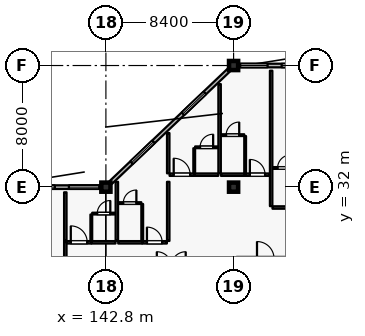
"""IFC4 building model, lengths in metres.
Left out: names, types, materials, properties, quantities, classifications, styles, units other than length and angle.
Written with IfcOpenShell. Run it as: python <this file> out.ifc"""

import sys

from ifc_helpers import new_model, si_unit, direction, frame, frame_2d, origin, origin_2d, place, context, subcontext, project, spatial, rectangle, extrude, element, fill, save


model = new_model("IFC4")
c1 = context("Model", 3, precision=1e-05, world=origin(), true_north=direction((0.0, 1.0)))
c2 = subcontext(c1, "Body", "Model", "MODEL_VIEW")
j1 = project(units=[si_unit("LENGTHUNIT", "METRE"), si_unit("PLANEANGLEUNIT", "RADIAN")], contexts=[c1])
p1 = place(None, origin())
s1 = spatial("IfcSite", under=j1, at=p1, CompositionType="ELEMENT")
p2 = place(p1, origin())
s2 = spatial("IfcBuilding", under=s1, at=p2, CompositionType="ELEMENT")
p3 = place(p2, frame((0.0, 0.0, 43.2)))
s3 = spatial("IfcBuildingStorey", under=s2, at=p3, CompositionType="ELEMENT", Elevation=43.2)
for number, where, z_axis, x_axis in (
    (1, (142.8, 32.0, 0.0), (0.0, 0.0, 1.0), (1.0, 0.0, 0.0)),
    (2, (151.2, 40.0, 0.0), (0.0, 0.0, 1.0), (1.0, 0.0, 0.0)),
    (3, (151.2, 32.0, 0.0), (0.0, 0.0, 1.0), (1.0, 0.0, 0.0)),
):
    element("IfcColumn", number, at=place(p3, frame(where, z_axis=z_axis, x_axis=x_axis)), inside=s3, PredefinedType="COLUMN", context=c2, shape_type="SweptSolid", body=[
        extrude(rectangle(XDim=0.6, YDim=0.6, at=origin_2d()), origin(), (0.0, 0.0, 1.0), 4.2),
    ])
p4 = place(p3, frame((134.7, 32.0, 0.0), z_axis=(0.0, 0.0, 1.0), x_axis=(1.0, 0.0, 0.0)))
e4 = element("IfcWall", 4, at=p4, inside=s3, PredefinedType="SOLIDWALL", context=c2, shape_type="SweptSolid", body=[
    extrude(rectangle(XDim=7.8, YDim=0.24, at=frame_2d((3.9, 0.0))), origin(), (0.0, 0.0, 1.0), 3.54),
])
p5 = place(p4, frame((0.175, 0.0, 0.8)))
e5 = element("IfcOpeningElement", 5, at=p5, cuts=e4, PredefinedType="OPENING", context=c2, shape_type="SweptSolid", body=[
    extrude(rectangle(XDim=1.6, YDim=1.6, at=frame_2d((0.8, 0.8))), frame((0.0, 0.13, 0.0), z_axis=(0.0, -1.0, 0.0), x_axis=(1.0, 0.0, 0.0)), (0.0, 0.0, 1.0), 0.26),
])
p6 = place(p4, frame((2.74, 0.0, 0.8)))
e6 = element("IfcOpeningElement", 6, at=p6, cuts=e4, PredefinedType="OPENING", context=c2, shape_type="SweptSolid", body=[
    extrude(rectangle(XDim=2.0, YDim=1.75, at=frame_2d((1.0, 0.875))), frame((0.0, 0.13, 0.0), z_axis=(0.0, -1.0, 0.0), x_axis=(1.0, 0.0, 0.0)), (0.0, 0.0, 1.0), 0.26),
])
p7 = place(p4, frame((5.665, 0.0, 0.8)))
e7 = element("IfcOpeningElement", 7, at=p7, cuts=e4, PredefinedType="OPENING", context=c2, shape_type="SweptSolid", body=[
    extrude(rectangle(XDim=2.0, YDim=1.75, at=frame_2d((1.0, 0.875))), frame((0.0, 0.13, 0.0), z_axis=(0.0, -1.0, 0.0), x_axis=(1.0, 0.0, 0.0)), (0.0, 0.0, 1.0), 0.26),
])
p8 = place(p3, frame((143.1, 32.286, 0.0), z_axis=(0.0, 0.0, 1.0), x_axis=(0.724145477467, 0.689647248573, 0.0)))
e8 = element("IfcWall", 8, at=p8, inside=s3, PredefinedType="SOLIDWALL", context=c2, shape_type="SweptSolid", body=[
    extrude(rectangle(XDim=10.771, YDim=0.24, at=frame_2d((5.385, 0.0))), origin(), (0.0, 0.0, 1.0), 3.54),
])
p9 = place(p8, frame((1.914, 0.0, 0.8)))
e9 = element("IfcOpeningElement", 9, at=p9, cuts=e8, PredefinedType="OPENING", context=c2, shape_type="SweptSolid", body=[
    extrude(rectangle(XDim=2.0, YDim=1.75, at=frame_2d((1.0, 0.875))), frame((0.0, 0.13, 0.0), z_axis=(0.0, -1.0, 0.0), x_axis=(1.0, 0.0, 0.0)), (0.0, 0.0, 1.0), 0.26),
])
p10 = place(p8, frame((6.581, 0.0, 0.8)))
e10 = element("IfcOpeningElement", 10, at=p10, cuts=e8, PredefinedType="OPENING", context=c2, shape_type="SweptSolid", body=[
    extrude(rectangle(XDim=2.0, YDim=1.75, at=frame_2d((1.0, 0.875))), frame((0.0, 0.13, 0.0), z_axis=(0.0, -1.0, 0.0), x_axis=(1.0, 0.0, 0.0)), (0.0, 0.0, 1.0), 0.26),
])
p11 = place(p3, frame((151.5, 40.0, 0.0), z_axis=(0.0, 0.0, 1.0), x_axis=(1.0, 0.0, 0.0)))
e11 = element("IfcWall", 11, at=p11, inside=s3, PredefinedType="SOLIDWALL", context=c2, shape_type="SweptSolid", body=[
    extrude(rectangle(XDim=7.8, YDim=0.24, at=frame_2d((3.9, 0.0))), origin(), (0.0, 0.0, 1.0), 3.49),
])
p12 = place(p11, frame((0.135, 0.0, 0.8)))
e12 = element("IfcOpeningElement", 12, at=p12, cuts=e11, PredefinedType="OPENING", context=c2, shape_type="SweptSolid", body=[
    extrude(rectangle(XDim=1.8, YDim=1.7, at=frame_2d((0.9, 0.85))), frame((0.0, 0.13, 0.0), z_axis=(0.0, -1.0, 0.0), x_axis=(1.0, 0.0, 0.0)), (0.0, 0.0, 1.0), 0.26),
])
p13 = place(p11, frame((2.86, 0.0, 0.8)))
e13 = element("IfcOpeningElement", 13, at=p13, cuts=e11, PredefinedType="OPENING", context=c2, shape_type="SweptSolid", body=[
    extrude(rectangle(XDim=2.0, YDim=1.75, at=frame_2d((1.0, 0.875))), frame((0.0, 0.13, 0.0), z_axis=(0.0, -1.0, 0.0), x_axis=(1.0, 0.0, 0.0)), (0.0, 0.0, 1.0), 0.26),
])
p14 = place(p11, frame((5.825, 0.0, 0.8)))
e14 = element("IfcOpeningElement", 14, at=p14, cuts=e11, PredefinedType="OPENING", context=c2, shape_type="SweptSolid", body=[
    extrude(rectangle(XDim=1.8, YDim=1.7, at=frame_2d((0.9, 0.85))), frame((0.0, 0.13, 0.0), z_axis=(0.0, -1.0, 0.0), x_axis=(1.0, 0.0, 0.0)), (0.0, 0.0, 1.0), 0.26),
])
p15 = place(p3, frame((140.13, 25.06, 0.0), z_axis=(0.0, 0.0, 1.0), x_axis=(0.0, 1.0, 0.0)))
e15 = element("IfcWall", 15, at=p15, inside=s3, PredefinedType="PARTITIONING", context=c2, shape_type="SweptSolid", body=[
    extrude(rectangle(XDim=3.39, YDim=0.16, at=frame_2d((1.695, 0.0))), origin(), (0.0, 0.0, 1.0), 3.935),
])
p16 = place(p3, frame((140.22, 28.37, 0.0), z_axis=(0.0, 0.0, 1.0), x_axis=(1.0, 0.0, 0.0)))
e16 = element("IfcWall", 16, at=p16, inside=s3, PredefinedType="PARTITIONING", context=c2, shape_type="SweptSolid", body=[
    extrude(rectangle(XDim=1.62, YDim=0.16, at=frame_2d((0.81, 0.0))), origin(), (0.0, 0.0, 1.0), 3.935),
])
p17 = place(p16, frame((0.27, 0.0, 0.0)))
e17 = element("IfcOpeningElement", 17, at=p17, cuts=e16, PredefinedType="OPENING", context=c2, shape_type="SweptSolid", body=[
    extrude(rectangle(XDim=1.08, YDim=2.3, at=frame_2d((0.54, 1.15))), frame((0.0, 0.09, 0.0), z_axis=(0.0, -1.0, 0.0), x_axis=(1.0, 0.0, 0.0)), (0.0, 0.0, 1.0), 0.18),
])
p18 = place(p3, frame((141.85, 28.37, 0.0), z_axis=(0.0, 0.0, 1.0), x_axis=(1.0, 0.0, 0.0)))
e18 = element("IfcWall", 18, at=p18, inside=s3, PredefinedType="PARTITIONING", context=c2, shape_type="SweptSolid", body=[
    extrude(rectangle(XDim=1.58, YDim=0.16, at=frame_2d((0.79, 0.0))), origin(), (0.0, 0.0, 1.0), 3.935),
])
p19 = place(p3, frame((141.84, 28.46, 0.0), z_axis=(0.0, 0.0, 1.0), x_axis=(0.0, 1.0, 0.0)))
e19 = element("IfcWall", 19, at=p19, inside=s3, PredefinedType="PARTITIONING", context=c2, shape_type="SweptSolid", body=[
    extrude(rectangle(XDim=1.74, YDim=0.115, at=frame_2d((0.87, 0.0))), origin(), (0.0, 0.0, 1.0), 3.935),
])
p20 = place(p3, frame((141.9, 30.26, 0.0), z_axis=(0.0, 0.0, 1.0), x_axis=(1.0, 0.0, 0.0)))
e20 = element("IfcWall", 20, at=p20, inside=s3, PredefinedType="PARTITIONING", context=c2, shape_type="SweptSolid", body=[
    extrude(rectangle(XDim=1.52, YDim=0.115, at=frame_2d((0.76, 0.0))), origin(), (0.0, 0.0, 1.0), 3.935),
])
p21 = place(p20, frame((0.33, 0.0, 0.0)))
e21 = element("IfcOpeningElement", 21, at=p21, cuts=e20, PredefinedType="OPENING", context=c2, shape_type="SweptSolid", body=[
    extrude(rectangle(XDim=0.86, YDim=2.12, at=frame_2d((0.43, 1.06))), frame((0.0, 0.067, 0.0), z_axis=(0.0, -1.0, 0.0), x_axis=(1.0, 0.0, 0.0)), (0.0, 0.0, 1.0), 0.135),
])
p22 = place(p3, frame((140.13, 28.46, 0.0), z_axis=(0.0, 0.0, 1.0), x_axis=(0.0, 1.0, 0.0)))
e22 = element("IfcWall", 22, at=p22, inside=s3, PredefinedType="PARTITIONING", context=c2, shape_type="SweptSolid", body=[
    extrude(rectangle(XDim=3.2, YDim=0.16, at=frame_2d((1.6, 0.0))), origin(), (0.0, 0.0, 1.0), 3.935),
])
p23 = place(p3, frame((143.61, 28.37, 0.0), z_axis=(0.0, 0.0, 1.0), x_axis=(1.0, 0.0, 0.0)))
e23 = element("IfcWall", 23, at=p23, inside=s3, PredefinedType="PARTITIONING", context=c2, shape_type="SweptSolid", body=[
    extrude(rectangle(XDim=1.57, YDim=0.16, at=frame_2d((0.785, 0.0))), origin(), (0.0, 0.0, 1.0), 3.935),
])
p24 = place(p3, frame((145.19, 28.37, 0.0), z_axis=(0.0, 0.0, 1.0), x_axis=(1.0, 0.0, 0.0)))
e24 = element("IfcWall", 24, at=p24, inside=s3, PredefinedType="PARTITIONING", context=c2, shape_type="SweptSolid", body=[
    extrude(rectangle(XDim=1.62, YDim=0.16, at=frame_2d((0.81, 0.0))), origin(), (0.0, 0.0, 1.0), 3.935),
])
p25 = place(p24, frame((0.31, 0.0, 0.0)))
e25 = element("IfcOpeningElement", 25, at=p25, cuts=e24, PredefinedType="OPENING", context=c2, shape_type="SweptSolid", body=[
    extrude(rectangle(XDim=1.0, YDim=2.25, at=frame_2d((0.5, 1.125))), frame((0.0, 0.09, 0.0), z_axis=(0.0, -1.0, 0.0), x_axis=(1.0, 0.0, 0.0)), (0.0, 0.0, 1.0), 0.18),
])
p26 = place(p3, frame((145.19, 28.46, 0.0), z_axis=(0.0, 0.0, 1.0), x_axis=(0.0, 1.0, 0.0)))
e26 = element("IfcWall", 26, at=p26, inside=s3, PredefinedType="PARTITIONING", context=c2, shape_type="SweptSolid", body=[
    extrude(rectangle(XDim=2.43, YDim=0.115, at=frame_2d((1.215, 0.0))), origin(), (0.0, 0.0, 1.0), 3.935),
])
p27 = place(p3, frame((143.62, 30.95, 0.0), z_axis=(0.0, 0.0, 1.0), x_axis=(1.0, 0.0, 0.0)))
e27 = element("IfcWall", 27, at=p27, inside=s3, PredefinedType="PARTITIONING", context=c2, shape_type="SweptSolid", body=[
    extrude(rectangle(XDim=1.51, YDim=0.115, at=frame_2d((0.755, 0.0))), origin(), (0.0, 0.0, 1.0), 3.935),
])
p28 = place(p27, frame((0.325, 0.0, 0.0)))
e28 = element("IfcOpeningElement", 28, at=p28, cuts=e27, PredefinedType="OPENING", context=c2, shape_type="SweptSolid", body=[
    extrude(rectangle(XDim=0.86, YDim=2.12, at=frame_2d((0.43, 1.06))), frame((0.0, 0.067, 0.0), z_axis=(0.0, -1.0, 0.0), x_axis=(1.0, 0.0, 0.0)), (0.0, 0.0, 1.0), 0.135),
])
for number, where, z_axis, x_axis in (
    (29, (143.52, 28.46, 0.0), (0.0, 0.0, 1.0), (0.0, 1.0, 0.0)),
    (30, (146.9, 28.46, 0.0), (0.0, 0.0, 1.0), (0.0, 1.0, 0.0)),
):
    element("IfcWall", number, at=place(p3, frame(where, z_axis=z_axis, x_axis=x_axis)), inside=s3, PredefinedType="PARTITIONING", context=c2, shape_type="SweptSolid", body=[
        extrude(rectangle(XDim=3.89, YDim=0.16, at=frame_2d((1.945, 0.0))), origin(), (0.0, 0.0, 1.0), 3.935),
    ])
p29 = place(p3, frame((146.99, 32.82, 0.0), z_axis=(0.0, 0.0, 1.0), x_axis=(1.0, 0.0, 0.0)))
e31 = element("IfcWall", 31, at=p29, inside=s3, PredefinedType="PARTITIONING", context=c2, shape_type="SweptSolid", body=[
    extrude(rectangle(XDim=1.62, YDim=0.16, at=frame_2d((0.81, 0.0))), origin(), (0.0, 0.0, 1.0), 3.935),
])
p30 = place(p29, frame((0.27, 0.0, 0.0)))
e32 = element("IfcOpeningElement", 32, at=p30, cuts=e31, PredefinedType="OPENING", context=c2, shape_type="SweptSolid", body=[
    extrude(rectangle(XDim=1.08, YDim=2.3, at=frame_2d((0.54, 1.15))), frame((0.0, 0.09, 0.0), z_axis=(0.0, -1.0, 0.0), x_axis=(1.0, 0.0, 0.0)), (0.0, 0.0, 1.0), 0.18),
])
p31 = place(p3, frame((148.62, 32.82, 0.0), z_axis=(0.0, 0.0, 1.0), x_axis=(1.0, 0.0, 0.0)))
e33 = element("IfcWall", 33, at=p31, inside=s3, PredefinedType="PARTITIONING", context=c2, shape_type="SweptSolid", body=[
    extrude(rectangle(XDim=1.57, YDim=0.16, at=frame_2d((0.785, 0.0))), origin(), (0.0, 0.0, 1.0), 3.935),
])
p32 = place(p3, frame((148.61, 32.91, 0.0), z_axis=(0.0, 0.0, 1.0), x_axis=(0.0, 1.0, 0.0)))
e34 = element("IfcWall", 34, at=p32, inside=s3, PredefinedType="PARTITIONING", context=c2, shape_type="SweptSolid", body=[
    extrude(rectangle(XDim=1.65, YDim=0.115, at=frame_2d((0.825, 0.0))), origin(), (0.0, 0.0, 1.0), 3.935),
])
p33 = place(p3, frame((148.67, 34.62, 0.0), z_axis=(0.0, 0.0, 1.0), x_axis=(1.0, 0.0, 0.0)))
e35 = element("IfcWall", 35, at=p33, inside=s3, PredefinedType="PARTITIONING", context=c2, shape_type="SweptSolid", body=[
    extrude(rectangle(XDim=1.51, YDim=0.115, at=frame_2d((0.755, 0.0))), origin(), (0.0, 0.0, 1.0), 3.935),
])
p34 = place(p33, frame((0.325, 0.0, 0.0)))
e36 = element("IfcOpeningElement", 36, at=p34, cuts=e35, PredefinedType="OPENING", context=c2, shape_type="SweptSolid", body=[
    extrude(rectangle(XDim=0.86, YDim=2.12, at=frame_2d((0.43, 1.06))), frame((0.0, 0.067, 0.0), z_axis=(0.0, -1.0, 0.0), x_axis=(1.0, 0.0, 0.0)), (0.0, 0.0, 1.0), 0.135),
])
p35 = place(p3, frame((146.9, 32.91, 0.0), z_axis=(0.0, 0.0, 1.0), x_axis=(0.0, 1.0, 0.0)))
e37 = element("IfcWall", 37, at=p35, inside=s3, PredefinedType="PARTITIONING", context=c2, shape_type="SweptSolid", body=[
    extrude(rectangle(XDim=2.65, YDim=0.16, at=frame_2d((1.325, 0.0))), origin(), (0.0, 0.0, 1.0), 3.935),
])
p36 = place(p3, frame((150.37, 32.82, 0.0), z_axis=(0.0, 0.0, 1.0), x_axis=(1.0, 0.0, 0.0)))
e38 = element("IfcWall", 38, at=p36, inside=s3, PredefinedType="PARTITIONING", context=c2, shape_type="SweptSolid", body=[
    extrude(rectangle(XDim=1.58, YDim=0.16, at=frame_2d((0.79, 0.0))), origin(), (0.0, 0.0, 1.0), 3.935),
])
p37 = place(p3, frame((151.96, 32.82, 0.0), z_axis=(0.0, 0.0, 1.0), x_axis=(1.0, 0.0, 0.0)))
e39 = element("IfcWall", 39, at=p37, inside=s3, PredefinedType="PARTITIONING", context=c2, shape_type="SweptSolid", body=[
    extrude(rectangle(XDim=1.62, YDim=0.16, at=frame_2d((0.81, 0.0))), origin(), (0.0, 0.0, 1.0), 3.935),
])
p38 = place(p37, frame((0.31, 0.0, 0.0)))
e40 = element("IfcOpeningElement", 40, at=p38, cuts=e39, PredefinedType="OPENING", context=c2, shape_type="SweptSolid", body=[
    extrude(rectangle(XDim=1.0, YDim=2.25, at=frame_2d((0.5, 1.125))), frame((0.0, 0.09, 0.0), z_axis=(0.0, -1.0, 0.0), x_axis=(1.0, 0.0, 0.0)), (0.0, 0.0, 1.0), 0.18),
])
p39 = place(p3, frame((151.96, 32.91, 0.0), z_axis=(0.0, 0.0, 1.0), x_axis=(0.0, 1.0, 0.0)))
e41 = element("IfcWall", 41, at=p39, inside=s3, PredefinedType="PARTITIONING", context=c2, shape_type="SweptSolid", body=[
    extrude(rectangle(XDim=2.45, YDim=0.115, at=frame_2d((1.225, 0.0))), origin(), (0.0, 0.0, 1.0), 3.935),
])
p40 = place(p3, frame((150.38, 35.42, 0.0), z_axis=(0.0, 0.0, 1.0), x_axis=(1.0, 0.0, 0.0)))
e42 = element("IfcWall", 42, at=p40, inside=s3, PredefinedType="PARTITIONING", context=c2, shape_type="SweptSolid", body=[
    extrude(rectangle(XDim=1.52, YDim=0.115, at=frame_2d((0.76, 0.0))), origin(), (0.0, 0.0, 1.0), 3.935),
])
p41 = place(p40, frame((0.33, 0.0, 0.0)))
e43 = element("IfcOpeningElement", 43, at=p41, cuts=e42, PredefinedType="OPENING", context=c2, shape_type="SweptSolid", body=[
    extrude(rectangle(XDim=0.86, YDim=2.12, at=frame_2d((0.43, 1.06))), frame((0.0, 0.067, 0.0), z_axis=(0.0, -1.0, 0.0), x_axis=(1.0, 0.0, 0.0)), (0.0, 0.0, 1.0), 0.135),
])
p42 = place(p3, frame((150.28, 32.91, 0.0), z_axis=(0.0, 0.0, 1.0), x_axis=(0.0, 1.0, 0.0)))
e44 = element("IfcWall", 44, at=p42, inside=s3, PredefinedType="PARTITIONING", context=c2, shape_type="SweptSolid", body=[
    extrude(rectangle(XDim=5.87, YDim=0.16, at=frame_2d((2.935, 0.0))), origin(), (0.0, 0.0, 1.0), 3.935),
])
p43 = place(p3, frame((153.76, 30.66, 0.0), z_axis=(0.0, 0.0, 1.0), x_axis=(1.0, 0.0, 0.0)))
e45 = element("IfcWall", 45, at=p43, inside=s3, PredefinedType="PARTITIONING", context=c2, shape_type="SweptSolid", body=[
    extrude(rectangle(XDim=1.57, YDim=0.16, at=frame_2d((0.785, 0.0))), origin(), (0.0, 0.0, 1.0), 3.935),
])
p44 = place(p3, frame((153.77, 33.26, 0.0), z_axis=(0.0, 0.0, 1.0), x_axis=(1.0, 0.0, 0.0)))
e46 = element("IfcWall", 46, at=p44, inside=s3, PredefinedType="PARTITIONING", context=c2, shape_type="SweptSolid", body=[
    extrude(rectangle(XDim=1.51, YDim=0.115, at=frame_2d((0.755, 0.0))), origin(), (0.0, 0.0, 1.0), 3.935),
])
p45 = place(p44, frame((0.325, 0.0, 0.0)))
e47 = element("IfcOpeningElement", 47, at=p45, cuts=e46, PredefinedType="OPENING", context=c2, shape_type="SweptSolid", body=[
    extrude(rectangle(XDim=0.86, YDim=2.12, at=frame_2d((0.43, 1.06))), frame((0.0, 0.067, 0.0), z_axis=(0.0, -1.0, 0.0), x_axis=(1.0, 0.0, 0.0)), (0.0, 0.0, 1.0), 0.135),
])
p46 = place(p3, frame((153.67, 30.75, 0.0), z_axis=(0.0, 0.0, 1.0), x_axis=(0.0, 1.0, 0.0)))
e48 = element("IfcWall", 48, at=p46, inside=s3, PredefinedType="PARTITIONING", context=c2, shape_type="SweptSolid", body=[
    extrude(rectangle(XDim=8.91, YDim=0.16, at=frame_2d((4.455, 0.0))), origin(), (0.0, 0.0, 1.0), 3.935),
])
p47 = place(p6, origin())
e49 = element("IfcWindow", 49, at=p47, inside=s3, PartitioningType="DOUBLE_PANEL_VERTICAL", PredefinedType="WINDOW", context=c2, shape_type="SweptSolid", body=[
    extrude(rectangle(XDim=2.0, YDim=1.75, at=frame_2d((1.0, 0.875))), frame((0.0, 0.03, 0.0), z_axis=(0.0, -1.0, 0.0), x_axis=(1.0, 0.0, 0.0)), (0.0, 0.0, 1.0), 0.06),
])
fill(e6, e49)
p48 = place(p7, origin())
e50 = element("IfcWindow", 50, at=p48, inside=s3, PartitioningType="DOUBLE_PANEL_VERTICAL", PredefinedType="WINDOW", context=c2, shape_type="SweptSolid", body=[
    extrude(rectangle(XDim=2.0, YDim=1.75, at=frame_2d((1.0, 0.875))), frame((0.0, 0.03, 0.0), z_axis=(0.0, -1.0, 0.0), x_axis=(1.0, 0.0, 0.0)), (0.0, 0.0, 1.0), 0.06),
])
fill(e7, e50)
p49 = place(p9, origin())
e51 = element("IfcWindow", 51, at=p49, inside=s3, PartitioningType="DOUBLE_PANEL_VERTICAL", PredefinedType="WINDOW", context=c2, shape_type="SweptSolid", body=[
    extrude(rectangle(XDim=2.0, YDim=1.75, at=frame_2d((1.0, 0.875))), frame((0.0, 0.03, 0.0), z_axis=(0.0, -1.0, 0.0), x_axis=(1.0, 0.0, 0.0)), (0.0, 0.0, 1.0), 0.06),
])
fill(e9, e51)
p50 = place(p10, origin())
e52 = element("IfcWindow", 52, at=p50, inside=s3, PartitioningType="DOUBLE_PANEL_VERTICAL", PredefinedType="WINDOW", context=c2, shape_type="SweptSolid", body=[
    extrude(rectangle(XDim=2.0, YDim=1.75, at=frame_2d((1.0, 0.875))), frame((0.0, 0.03, 0.0), z_axis=(0.0, -1.0, 0.0), x_axis=(1.0, 0.0, 0.0)), (0.0, 0.0, 1.0), 0.06),
])
fill(e10, e52)
p51 = place(p12, origin())
e53 = element("IfcWindow", 53, at=p51, inside=s3, PartitioningType="DOUBLE_PANEL_VERTICAL", PredefinedType="WINDOW", context=c2, shape_type="SweptSolid", body=[
    extrude(rectangle(XDim=1.8, YDim=1.7, at=frame_2d((0.9, 0.85))), frame((0.0, 0.03, 0.0), z_axis=(0.0, -1.0, 0.0), x_axis=(1.0, 0.0, 0.0)), (0.0, 0.0, 1.0), 0.06),
])
fill(e12, e53)
p52 = place(p13, origin())
e54 = element("IfcWindow", 54, at=p52, inside=s3, PartitioningType="DOUBLE_PANEL_VERTICAL", PredefinedType="WINDOW", context=c2, shape_type="SweptSolid", body=[
    extrude(rectangle(XDim=2.0, YDim=1.75, at=frame_2d((1.0, 0.875))), frame((0.0, 0.03, 0.0), z_axis=(0.0, -1.0, 0.0), x_axis=(1.0, 0.0, 0.0)), (0.0, 0.0, 1.0), 0.06),
])
fill(e13, e54)
p53 = place(p17, origin())
e55 = element("IfcDoor", 55, at=p53, inside=s3, OperationType="SINGLE_SWING_LEFT", PredefinedType="DOOR", context=c2, shape_type="SweptSolid", body=[
    extrude(rectangle(XDim=1.08, YDim=2.3, at=frame_2d((0.54, 1.15))), frame((0.0, 0.025, 0.0), z_axis=(0.0, -1.0, 0.0), x_axis=(1.0, 0.0, 0.0)), (0.0, 0.0, 1.0), 0.05),
])
fill(e17, e55)
p54 = place(p21, origin())
e56 = element("IfcDoor", 56, at=p54, inside=s3, OperationType="SINGLE_SWING_RIGHT", PredefinedType="DOOR", context=c2, shape_type="SweptSolid", body=[
    extrude(rectangle(XDim=0.86, YDim=2.12, at=frame_2d((0.43, 1.06))), frame((0.0, 0.025, 0.0), z_axis=(0.0, -1.0, 0.0), x_axis=(1.0, 0.0, 0.0)), (0.0, 0.0, 1.0), 0.05),
])
fill(e21, e56)
p55 = place(p25, origin())
e57 = element("IfcDoor", 57, at=p55, inside=s3, OperationType="SINGLE_SWING_LEFT", PredefinedType="DOOR", context=c2, shape_type="SweptSolid", body=[
    extrude(rectangle(XDim=1.0, YDim=2.25, at=frame_2d((0.5, 1.125))), frame((0.0, 0.025, 0.0), z_axis=(0.0, -1.0, 0.0), x_axis=(1.0, 0.0, 0.0)), (0.0, 0.0, 1.0), 0.05),
])
fill(e25, e57)
p56 = place(p28, origin())
e58 = element("IfcDoor", 58, at=p56, inside=s3, OperationType="SINGLE_SWING_RIGHT", PredefinedType="DOOR", context=c2, shape_type="SweptSolid", body=[
    extrude(rectangle(XDim=0.86, YDim=2.12, at=frame_2d((0.43, 1.06))), frame((0.0, 0.025, 0.0), z_axis=(0.0, -1.0, 0.0), x_axis=(1.0, 0.0, 0.0)), (0.0, 0.0, 1.0), 0.05),
])
fill(e28, e58)
p57 = place(p30, origin())
e59 = element("IfcDoor", 59, at=p57, inside=s3, OperationType="SINGLE_SWING_LEFT", PredefinedType="DOOR", context=c2, shape_type="SweptSolid", body=[
    extrude(rectangle(XDim=1.08, YDim=2.3, at=frame_2d((0.54, 1.15))), frame((0.0, 0.025, 0.0), z_axis=(0.0, -1.0, 0.0), x_axis=(1.0, 0.0, 0.0)), (0.0, 0.0, 1.0), 0.05),
])
fill(e32, e59)
p58 = place(p34, origin())
e60 = element("IfcDoor", 60, at=p58, inside=s3, OperationType="SINGLE_SWING_RIGHT", PredefinedType="DOOR", context=c2, shape_type="SweptSolid", body=[
    extrude(rectangle(XDim=0.86, YDim=2.12, at=frame_2d((0.43, 1.06))), frame((0.0, 0.025, 0.0), z_axis=(0.0, -1.0, 0.0), x_axis=(1.0, 0.0, 0.0)), (0.0, 0.0, 1.0), 0.05),
])
fill(e36, e60)
p59 = place(p38, origin())
e61 = element("IfcDoor", 61, at=p59, inside=s3, OperationType="SINGLE_SWING_LEFT", PredefinedType="DOOR", context=c2, shape_type="SweptSolid", body=[
    extrude(rectangle(XDim=1.0, YDim=2.25, at=frame_2d((0.5, 1.125))), frame((0.0, 0.025, 0.0), z_axis=(0.0, -1.0, 0.0), x_axis=(1.0, 0.0, 0.0)), (0.0, 0.0, 1.0), 0.05),
])
fill(e40, e61)
p60 = place(p41, origin())
e62 = element("IfcDoor", 62, at=p60, inside=s3, OperationType="SINGLE_SWING_RIGHT", PredefinedType="DOOR", context=c2, shape_type="SweptSolid", body=[
    extrude(rectangle(XDim=0.86, YDim=2.12, at=frame_2d((0.43, 1.06))), frame((0.0, 0.025, 0.0), z_axis=(0.0, -1.0, 0.0), x_axis=(1.0, 0.0, 0.0)), (0.0, 0.0, 1.0), 0.05),
])
fill(e43, e62)
p61 = place(p45, origin())
e63 = element("IfcDoor", 63, at=p61, inside=s3, OperationType="SINGLE_SWING_RIGHT", PredefinedType="DOOR", context=c2, shape_type="SweptSolid", body=[
    extrude(rectangle(XDim=0.86, YDim=2.12, at=frame_2d((0.43, 1.06))), frame((0.0, 0.025, 0.0), z_axis=(0.0, -1.0, 0.0), x_axis=(1.0, 0.0, 0.0)), (0.0, 0.0, 1.0), 0.05),
])
fill(e47, e63)
save(model, sys.argv[1])
